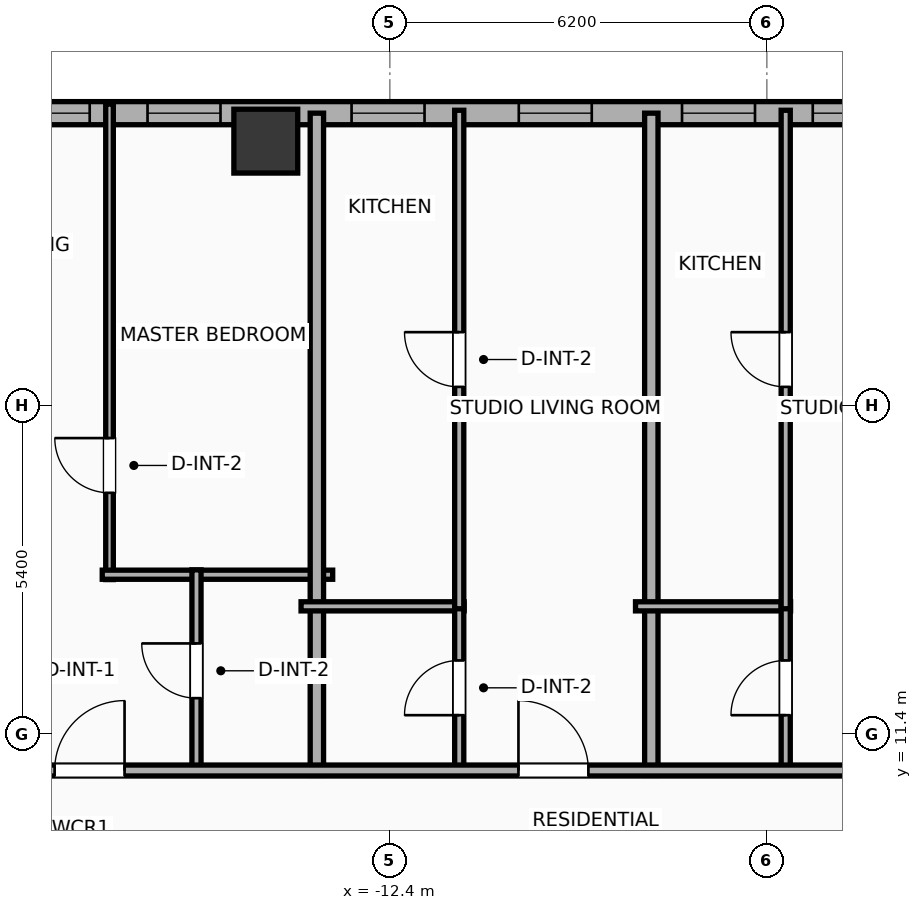
"""IFC4 building model, lengths in metres.
Left out: names, types, materials, properties, quantities, classifications, styles, units other than length and angle.
Written with IfcOpenShell. Run it as: python <this file> out.ifc"""

import sys

from ifc_helpers import new_model, si_unit, direction, frame, frame_2d, origin, origin_2d, place, context, subcontext, project, spatial, rectangle, hollow_rectangle, extrude, element, fill, save


model = new_model("IFC4")
c1 = context("Model", 3, precision=1e-05, world=origin(), true_north=direction((0.0, 1.0)))
c2 = subcontext(c1, "Body", "Model", "MODEL_VIEW")
j1 = project(units=[si_unit("LENGTHUNIT", "METRE"), si_unit("PLANEANGLEUNIT", "RADIAN")], contexts=[c1])
p1 = place(None, origin())
s1 = spatial("IfcSite", under=j1, at=p1, CompositionType="ELEMENT")
p2 = place(p1, origin())
s2 = spatial("IfcBuilding", under=s1, at=p2, CompositionType="ELEMENT")
p3 = place(p2, frame((0.0, 0.0, 109.2)))
s3 = spatial("IfcBuildingStorey", under=s2, at=p3, CompositionType="ELEMENT", Elevation=109.2)
p4 = place(p3, frame((-14.44, 21.15, 0.0), z_axis=(0.0, 0.0, 1.0), x_axis=(1.0, 0.0, 0.0)))
e1 = element("IfcColumn", 1, at=p4, inside=s3, PredefinedType="COLUMN", context=c2, shape_type="SweptSolid", body=[
    extrude(hollow_rectangle(XDim=1.05, YDim=1.05, WallThickness=0.036, at=origin_2d()), origin(), (0.0, 0.0, 1.0), 3.9),
])
p5 = place(p3, frame((-25.381, 21.61, 0.0), z_axis=(0.0, 0.0, 1.0), x_axis=(1.0, 0.0, 0.0)))
e2 = element("IfcWall", 2, at=p5, inside=s3, PredefinedType="ELEMENTEDWALL", context=c2, shape_type="SweptSolid", body=[
    extrude(rectangle(XDim=54.763, YDim=0.38, at=frame_2d((27.381, 0.0))), origin(), (0.0, 0.0, 1.0), 3.65),
])
p6 = place(p5, frame((5.645, 0.0, 0.75)))
e3 = element("IfcOpeningElement", 3, at=p6, cuts=e2, PredefinedType="OPENING", context=c2, shape_type="SweptSolid", body=[
    extrude(rectangle(XDim=2.4, YDim=2.1, at=frame_2d((1.2, 1.05))), frame((0.0, 0.2, 0.0), z_axis=(0.0, -1.0, 0.0), x_axis=(1.0, 0.0, 0.0)), (0.0, 0.0, 1.0), 0.4),
])
p7 = place(p5, frame((45.067, 0.0, 0.75)))
e4 = element("IfcOpeningElement", 4, at=p7, cuts=e2, PredefinedType="OPENING", context=c2, shape_type="SweptSolid", body=[
    extrude(rectangle(XDim=2.4, YDim=2.1, at=frame_2d((1.2, 1.05))), frame((0.0, 0.2, 0.0), z_axis=(0.0, -1.0, 0.0), x_axis=(1.0, 0.0, 0.0)), (0.0, 0.0, 1.0), 0.4),
])
p8 = place(p5, frame((1.831, 0.0, 0.75)))
e5 = element("IfcOpeningElement", 5, at=p8, cuts=e2, PredefinedType="OPENING", context=c2, shape_type="SweptSolid", body=[
    extrude(rectangle(XDim=1.2, YDim=2.05, at=frame_2d((0.6, 1.025))), frame((0.0, 0.2, 0.0), z_axis=(0.0, -1.0, 0.0), x_axis=(1.0, 0.0, 0.0)), (0.0, 0.0, 1.0), 0.4),
])
p9 = place(p5, frame((8.996, 0.0, 0.75)))
e6 = element("IfcOpeningElement", 6, at=p9, cuts=e2, PredefinedType="OPENING", context=c2, shape_type="SweptSolid", body=[
    extrude(rectangle(XDim=1.2, YDim=2.05, at=frame_2d((0.6, 1.025))), frame((0.0, 0.2, 0.0), z_axis=(0.0, -1.0, 0.0), x_axis=(1.0, 0.0, 0.0)), (0.0, 0.0, 1.0), 0.4),
])
p10 = place(p5, frame((15.102, 0.0, 0.75)))
e7 = element("IfcOpeningElement", 7, at=p10, cuts=e2, PredefinedType="OPENING", context=c2, shape_type="SweptSolid", body=[
    extrude(rectangle(XDim=1.2, YDim=2.05, at=frame_2d((0.6, 1.025))), frame((0.0, 0.2, 0.0), z_axis=(0.0, -1.0, 0.0), x_axis=(1.0, 0.0, 0.0)), (0.0, 0.0, 1.0), 0.4),
])
p11 = place(p5, frame((12.352, 0.0, 0.75)))
e8 = element("IfcOpeningElement", 8, at=p11, cuts=e2, PredefinedType="OPENING", context=c2, shape_type="SweptSolid", body=[
    extrude(rectangle(XDim=1.2, YDim=2.05, at=frame_2d((0.6, 1.025))), frame((0.0, 0.2, 0.0), z_axis=(0.0, -1.0, 0.0), x_axis=(1.0, 0.0, 0.0)), (0.0, 0.0, 1.0), 0.4),
])
p12 = place(p5, frame((19.936, 0.0, 0.75)))
e9 = element("IfcOpeningElement", 9, at=p12, cuts=e2, PredefinedType="OPENING", context=c2, shape_type="SweptSolid", body=[
    extrude(rectangle(XDim=1.2, YDim=2.05, at=frame_2d((0.6, 1.025))), frame((0.0, 0.2, 0.0), z_axis=(0.0, -1.0, 0.0), x_axis=(1.0, 0.0, 0.0)), (0.0, 0.0, 1.0), 0.4),
])
p13 = place(p5, frame((17.786, 0.0, 0.75)))
e10 = element("IfcOpeningElement", 10, at=p13, cuts=e2, PredefinedType="OPENING", context=c2, shape_type="SweptSolid", body=[
    extrude(rectangle(XDim=1.2, YDim=2.05, at=frame_2d((0.6, 1.025))), frame((0.0, 0.2, 0.0), z_axis=(0.0, -1.0, 0.0), x_axis=(1.0, 0.0, 0.0)), (0.0, 0.0, 1.0), 0.4),
])
p14 = place(p5, frame((23.826, 0.0, 0.75)))
e11 = element("IfcOpeningElement", 11, at=p14, cuts=e2, PredefinedType="OPENING", context=c2, shape_type="SweptSolid", body=[
    extrude(rectangle(XDim=1.2, YDim=2.05, at=frame_2d((0.6, 1.025))), frame((0.0, 0.2, 0.0), z_axis=(0.0, -1.0, 0.0), x_axis=(1.0, 0.0, 0.0)), (0.0, 0.0, 1.0), 0.4),
])
p15 = place(p5, frame((26.576, 0.0, 0.75)))
e12 = element("IfcOpeningElement", 12, at=p15, cuts=e2, PredefinedType="OPENING", context=c2, shape_type="SweptSolid", body=[
    extrude(rectangle(XDim=1.2, YDim=2.05, at=frame_2d((0.6, 1.025))), frame((0.0, 0.2, 0.0), z_axis=(0.0, -1.0, 0.0), x_axis=(1.0, 0.0, 0.0)), (0.0, 0.0, 1.0), 0.4),
])
p16 = place(p5, frame((30.431, 0.0, 0.75)))
e13 = element("IfcOpeningElement", 13, at=p16, cuts=e2, PredefinedType="OPENING", context=c2, shape_type="SweptSolid", body=[
    extrude(rectangle(XDim=1.2, YDim=2.05, at=frame_2d((0.6, 1.025))), frame((0.0, 0.2, 0.0), z_axis=(0.0, -1.0, 0.0), x_axis=(1.0, 0.0, 0.0)), (0.0, 0.0, 1.0), 0.4),
])
p17 = place(p5, frame((38.581, 0.0, 0.75)))
e14 = element("IfcOpeningElement", 14, at=p17, cuts=e2, PredefinedType="OPENING", context=c2, shape_type="SweptSolid", body=[
    extrude(rectangle(XDim=1.2, YDim=2.05, at=frame_2d((0.6, 1.025))), frame((0.0, 0.2, 0.0), z_axis=(0.0, -1.0, 0.0), x_axis=(1.0, 0.0, 0.0)), (0.0, 0.0, 1.0), 0.4),
])
p18 = place(p5, frame((34.786, 0.0, 0.75)))
e15 = element("IfcOpeningElement", 15, at=p18, cuts=e2, PredefinedType="OPENING", context=c2, shape_type="SweptSolid", body=[
    extrude(rectangle(XDim=1.2, YDim=2.05, at=frame_2d((0.6, 1.025))), frame((0.0, 0.2, 0.0), z_axis=(0.0, -1.0, 0.0), x_axis=(1.0, 0.0, 0.0)), (0.0, 0.0, 1.0), 0.4),
])
p19 = place(p5, frame((41.876, 0.0, 0.75)))
e16 = element("IfcOpeningElement", 16, at=p19, cuts=e2, PredefinedType="OPENING", context=c2, shape_type="SweptSolid", body=[
    extrude(rectangle(XDim=1.2, YDim=2.05, at=frame_2d((0.6, 1.025))), frame((0.0, 0.2, 0.0), z_axis=(0.0, -1.0, 0.0), x_axis=(1.0, 0.0, 0.0)), (0.0, 0.0, 1.0), 0.4),
])
p20 = place(p5, frame((49.385, 0.0, 0.75)))
e17 = element("IfcOpeningElement", 17, at=p20, cuts=e2, PredefinedType="OPENING", context=c2, shape_type="SweptSolid", body=[
    extrude(rectangle(XDim=1.2, YDim=2.05, at=frame_2d((0.6, 1.025))), frame((0.0, 0.2, 0.0), z_axis=(0.0, -1.0, 0.0), x_axis=(1.0, 0.0, 0.0)), (0.0, 0.0, 1.0), 0.4),
])
p21 = place(p5, frame((52.181, 0.0, 0.75)))
e18 = element("IfcOpeningElement", 18, at=p21, cuts=e2, PredefinedType="OPENING", context=c2, shape_type="SweptSolid", body=[
    extrude(rectangle(XDim=1.2, YDim=2.05, at=frame_2d((0.6, 1.025))), frame((0.0, 0.2, 0.0), z_axis=(0.0, -1.0, 0.0), x_axis=(1.0, 0.0, 0.0)), (0.0, 0.0, 1.0), 0.4),
])
p22 = place(p3, frame((-17.01, 13.94, 0.0), z_axis=(0.0, 0.0, 1.0), x_axis=(0.0, 1.0, 0.0)))
e19 = element("IfcWall", 19, at=p22, inside=s3, PredefinedType="PARTITIONING", context=c2, shape_type="SweptSolid", body=[
    extrude(rectangle(XDim=7.82, YDim=0.125, at=frame_2d((3.91, 0.0))), origin(), (0.0, 0.0, 1.0), 3.65),
])
p23 = place(p22, frame((1.427, 0.0, 0.0)))
e20 = element("IfcOpeningElement", 20, at=p23, cuts=e19, PredefinedType="OPENING", context=c2, shape_type="SweptSolid", body=[
    extrude(rectangle(XDim=0.9, YDim=2.05, at=frame_2d((0.45, 1.025))), frame((0.0, 0.073, 0.0), z_axis=(0.0, -1.0, 0.0), x_axis=(1.0, 0.0, 0.0)), (0.0, 0.0, 1.0), 0.145),
])
p24 = place(p3, frame((-17.13, 14.02, 0.0), z_axis=(0.0, 0.0, 1.0), x_axis=(1.0, 0.0, 0.0)))
e21 = element("IfcWall", 21, at=p24, inside=s3, PredefinedType="PLUMBINGWALL", context=c2, shape_type="SweptSolid", body=[
    extrude(rectangle(XDim=3.79, YDim=0.15, at=frame_2d((1.895, 0.0))), origin(), (0.0, 0.0, 1.0), 3.65),
])
p25 = place(p3, frame((-15.58, 10.78, 0.0), z_axis=(0.0, 0.0, 1.0), x_axis=(0.0, 1.0, 0.0)))
e22 = element("IfcWall", 22, at=p25, inside=s3, PredefinedType="PLUMBINGWALL", context=c2, shape_type="SweptSolid", body=[
    extrude(rectangle(XDim=3.32, YDim=0.15, at=frame_2d((1.66, 0.0))), origin(), (0.0, 0.0, 1.0), 3.65),
])
p26 = place(p25, frame((1.21, 0.0, 0.0)))
e23 = element("IfcOpeningElement", 23, at=p26, cuts=e22, PredefinedType="OPENING", context=c2, shape_type="SweptSolid", body=[
    extrude(rectangle(XDim=0.9, YDim=2.05, at=frame_2d((0.45, 1.025))), frame((0.0, 0.085, 0.0), z_axis=(0.0, -1.0, 0.0), x_axis=(1.0, 0.0, 0.0)), (0.0, 0.0, 1.0), 0.17),
])
p27 = place(p3, frame((-13.6, 10.72, 0.0), z_axis=(0.0, 0.0, 1.0), x_axis=(0.0, 1.0, 0.0)))
e24 = element("IfcWall", 24, at=p27, inside=s3, PredefinedType="PARTITIONING", context=c2, shape_type="SweptSolid", body=[
    extrude(rectangle(XDim=10.89, YDim=0.22, at=frame_2d((5.445, 0.0))), origin(), (0.0, 0.0, 1.0), 3.65),
])
p28 = place(p3, frame((-13.86, 13.5, 0.0), z_axis=(0.0, 0.0, 1.0), x_axis=(1.0, 0.0, 0.0)))
e25 = element("IfcWall", 25, at=p28, inside=s3, PredefinedType="PLUMBINGWALL", context=c2, shape_type="SweptSolid", body=[
    extrude(rectangle(XDim=2.681, YDim=0.15, at=frame_2d((1.341, 0.0))), origin(), (0.0, 0.0, 1.0), 3.65),
])
p29 = place(p3, frame((-11.259, 10.78, 0.0), z_axis=(0.0, 0.0, 1.0), x_axis=(0.0, 1.0, 0.0)))
e26 = element("IfcWall", 26, at=p29, inside=s3, PredefinedType="PLUMBINGWALL", context=c2, shape_type="SweptSolid", body=[
    extrude(rectangle(XDim=2.76, YDim=0.15, at=frame_2d((1.38, 0.0))), origin(), (0.0, 0.0, 1.0), 3.65),
])
p30 = place(p29, frame((0.93, 0.0, 0.0)))
e27 = element("IfcOpeningElement", 27, at=p30, cuts=e26, PredefinedType="OPENING", context=c2, shape_type="SweptSolid", body=[
    extrude(rectangle(XDim=0.9, YDim=2.05, at=frame_2d((0.45, 1.025))), frame((0.0, 0.085, 0.0), z_axis=(0.0, -1.0, 0.0), x_axis=(1.0, 0.0, 0.0)), (0.0, 0.0, 1.0), 0.17),
])
p31 = place(p3, frame((-11.259, 13.46, 0.0), z_axis=(0.0, 0.0, 1.0), x_axis=(0.0, 1.0, 0.0)))
e28 = element("IfcWall", 28, at=p31, inside=s3, PredefinedType="PLUMBINGWALL", context=c2, shape_type="SweptSolid", body=[
    extrude(rectangle(XDim=8.198, YDim=0.15, at=frame_2d((4.099, 0.0))), origin(), (0.0, 0.0, 1.0), 3.65),
])
p32 = place(p31, frame((3.649, 0.0, 0.0)))
e29 = element("IfcOpeningElement", 29, at=p32, cuts=e28, PredefinedType="OPENING", context=c2, shape_type="SweptSolid", body=[
    extrude(rectangle(XDim=0.9, YDim=2.05, at=frame_2d((0.45, 1.025))), frame((0.0, 0.085, 0.0), z_axis=(0.0, -1.0, 0.0), x_axis=(1.0, 0.0, 0.0)), (0.0, 0.0, 1.0), 0.17),
])
p33 = place(p3, frame((-8.1, 10.72, 0.0), z_axis=(0.0, 0.0, 1.0), x_axis=(0.0, 1.0, 0.0)))
e30 = element("IfcWall", 30, at=p33, inside=s3, PredefinedType="PARTITIONING", context=c2, shape_type="SweptSolid", body=[
    extrude(rectangle(XDim=10.89, YDim=0.22, at=frame_2d((5.445, 0.0))), origin(), (0.0, 0.0, 1.0), 3.65),
])
p34 = place(p3, frame((-8.36, 13.5, 0.0), z_axis=(0.0, 0.0, 1.0), x_axis=(1.0, 0.0, 0.0)))
e31 = element("IfcWall", 31, at=p34, inside=s3, PredefinedType="PLUMBINGWALL", context=c2, shape_type="SweptSolid", body=[
    extrude(rectangle(XDim=2.55, YDim=0.15, at=frame_2d((1.275, 0.0))), origin(), (0.0, 0.0, 1.0), 3.65),
])
p35 = place(p3, frame((-5.89, 10.78, 0.0), z_axis=(0.0, 0.0, 1.0), x_axis=(0.0, 1.0, 0.0)))
e32 = element("IfcWall", 32, at=p35, inside=s3, PredefinedType="PLUMBINGWALL", context=c2, shape_type="SweptSolid", body=[
    extrude(rectangle(XDim=2.76, YDim=0.15, at=frame_2d((1.38, 0.0))), origin(), (0.0, 0.0, 1.0), 3.65),
])
p36 = place(p35, frame((0.93, 0.0, 0.0)))
e33 = element("IfcOpeningElement", 33, at=p36, cuts=e32, PredefinedType="OPENING", context=c2, shape_type="SweptSolid", body=[
    extrude(rectangle(XDim=0.9, YDim=2.05, at=frame_2d((0.45, 1.025))), frame((0.0, 0.085, 0.0), z_axis=(0.0, -1.0, 0.0), x_axis=(1.0, 0.0, 0.0)), (0.0, 0.0, 1.0), 0.17),
])
p37 = place(p3, frame((-5.89, 13.46, 0.0), z_axis=(0.0, 0.0, 1.0), x_axis=(0.0, 1.0, 0.0)))
e34 = element("IfcWall", 34, at=p37, inside=s3, PredefinedType="PLUMBINGWALL", context=c2, shape_type="SweptSolid", body=[
    extrude(rectangle(XDim=8.198, YDim=0.15, at=frame_2d((4.099, 0.0))), origin(), (0.0, 0.0, 1.0), 3.65),
])
p38 = place(p37, frame((3.649, 0.0, 0.0)))
e35 = element("IfcOpeningElement", 35, at=p38, cuts=e34, PredefinedType="OPENING", context=c2, shape_type="SweptSolid", body=[
    extrude(rectangle(XDim=0.9, YDim=2.05, at=frame_2d((0.45, 1.025))), frame((0.0, 0.085, 0.0), z_axis=(0.0, -1.0, 0.0), x_axis=(1.0, 0.0, 0.0)), (0.0, 0.0, 1.0), 0.17),
])
p39 = place(p3, frame((-29.21, 10.8, 0.0), z_axis=(0.0, 0.0, 1.0), x_axis=(1.0, 0.0, 0.0)))
e36 = element("IfcWall", 36, at=p39, inside=s3, PredefinedType="PARTITIONING", context=c2, shape_type="SweptSolid", body=[
    extrude(rectangle(XDim=62.42, YDim=0.18, at=frame_2d((31.21, 0.0))), origin(), (0.0, 0.0, 1.0), 3.65),
])
p40 = place(p39, frame((3.457, 0.0, 0.0)))
e37 = element("IfcOpeningElement", 37, at=p40, cuts=e36, PredefinedType="OPENING", context=c2, shape_type="SweptSolid", body=[
    extrude(rectangle(XDim=1.15, YDim=2.05, at=frame_2d((0.575, 1.025))), frame((0.0, 0.1, 0.0), z_axis=(0.0, -1.0, 0.0), x_axis=(1.0, 0.0, 0.0)), (0.0, 0.0, 1.0), 0.2),
])
p41 = place(p39, frame((11.297, 0.0, 0.0)))
e38 = element("IfcOpeningElement", 38, at=p41, cuts=e36, PredefinedType="OPENING", context=c2, shape_type="SweptSolid", body=[
    extrude(rectangle(XDim=1.15, YDim=2.05, at=frame_2d((0.575, 1.025))), frame((0.0, 0.1, 0.0), z_axis=(0.0, -1.0, 0.0), x_axis=(1.0, 0.0, 0.0)), (0.0, 0.0, 1.0), 0.2),
])
p42 = place(p39, frame((18.925, 0.0, 0.0)))
e39 = element("IfcOpeningElement", 39, at=p42, cuts=e36, PredefinedType="OPENING", context=c2, shape_type="SweptSolid", body=[
    extrude(rectangle(XDim=1.15, YDim=2.05, at=frame_2d((0.575, 1.025))), frame((0.0, 0.1, 0.0), z_axis=(0.0, -1.0, 0.0), x_axis=(1.0, 0.0, 0.0)), (0.0, 0.0, 1.0), 0.2),
])
p43 = place(p39, frame((24.362, 0.0, 0.0)))
e40 = element("IfcOpeningElement", 40, at=p43, cuts=e36, PredefinedType="OPENING", context=c2, shape_type="SweptSolid", body=[
    extrude(rectangle(XDim=1.15, YDim=2.05, at=frame_2d((0.575, 1.025))), frame((0.0, 0.1, 0.0), z_axis=(0.0, -1.0, 0.0), x_axis=(1.0, 0.0, 0.0)), (0.0, 0.0, 1.0), 0.2),
])
p44 = place(p39, frame((27.708, 0.0, 0.0)))
e41 = element("IfcOpeningElement", 41, at=p44, cuts=e36, PredefinedType="OPENING", context=c2, shape_type="SweptSolid", body=[
    extrude(rectangle(XDim=1.15, YDim=2.05, at=frame_2d((0.575, 1.025))), frame((0.0, 0.1, 0.0), z_axis=(0.0, -1.0, 0.0), x_axis=(1.0, 0.0, 0.0)), (0.0, 0.0, 1.0), 0.2),
])
p45 = place(p39, frame((34.618, 0.0, 0.0)))
e42 = element("IfcOpeningElement", 42, at=p45, cuts=e36, PredefinedType="OPENING", context=c2, shape_type="SweptSolid", body=[
    extrude(rectangle(XDim=0.9, YDim=2.05, at=frame_2d((0.45, 1.025))), frame((0.0, 0.1, 0.0), z_axis=(0.0, -1.0, 0.0), x_axis=(1.0, 0.0, 0.0)), (0.0, 0.0, 1.0), 0.2),
])
p46 = place(p39, frame((43.106, 0.0, 0.0)))
e43 = element("IfcOpeningElement", 43, at=p46, cuts=e36, PredefinedType="OPENING", context=c2, shape_type="SweptSolid", body=[
    extrude(rectangle(XDim=1.15, YDim=2.05, at=frame_2d((0.575, 1.025))), frame((0.0, 0.1, 0.0), z_axis=(0.0, -1.0, 0.0), x_axis=(1.0, 0.0, 0.0)), (0.0, 0.0, 1.0), 0.2),
])
p47 = place(p39, frame((51.777, 0.0, 0.0)))
e44 = element("IfcOpeningElement", 44, at=p47, cuts=e36, PredefinedType="OPENING", context=c2, shape_type="SweptSolid", body=[
    extrude(rectangle(XDim=0.9, YDim=2.05, at=frame_2d((0.45, 1.025))), frame((0.0, 0.1, 0.0), z_axis=(0.0, -1.0, 0.0), x_axis=(1.0, 0.0, 0.0)), (0.0, 0.0, 1.0), 0.2),
])
p48 = place(p39, frame((58.718, 0.0, 0.0)))
e45 = element("IfcOpeningElement", 45, at=p48, cuts=e36, PredefinedType="OPENING", context=c2, shape_type="SweptSolid", body=[
    extrude(rectangle(XDim=0.9, YDim=2.05, at=frame_2d((0.45, 1.025))), frame((0.0, 0.1, 0.0), z_axis=(0.0, -1.0, 0.0), x_axis=(1.0, 0.0, 0.0)), (0.0, 0.0, 1.0), 0.2),
])
p49 = place(p6, origin())
e46 = element("IfcWindow", 46, at=p49, inside=s3, PartitioningType="SINGLE_PANEL", PredefinedType="WINDOW", context=c2, shape_type="SweptSolid", body=[
    extrude(rectangle(XDim=2.4, YDim=2.1, at=frame_2d((1.2, 1.05))), frame((0.0, 0.03, 0.0), z_axis=(0.0, -1.0, 0.0), x_axis=(1.0, 0.0, 0.0)), (0.0, 0.0, 1.0), 0.06),
])
fill(e3, e46)
p50 = place(p9, origin())
e47 = element("IfcWindow", 47, at=p50, inside=s3, PartitioningType="SINGLE_PANEL", PredefinedType="WINDOW", context=c2, shape_type="SweptSolid", body=[
    extrude(rectangle(XDim=1.2, YDim=2.05, at=frame_2d((0.6, 1.025))), frame((0.0, 0.03, 0.0), z_axis=(0.0, -1.0, 0.0), x_axis=(1.0, 0.0, 0.0)), (0.0, 0.0, 1.0), 0.06),
])
fill(e6, e47)
p51 = place(p10, origin())
e48 = element("IfcWindow", 48, at=p51, inside=s3, PartitioningType="SINGLE_PANEL", PredefinedType="WINDOW", context=c2, shape_type="SweptSolid", body=[
    extrude(rectangle(XDim=1.2, YDim=2.05, at=frame_2d((0.6, 1.025))), frame((0.0, 0.03, 0.0), z_axis=(0.0, -1.0, 0.0), x_axis=(1.0, 0.0, 0.0)), (0.0, 0.0, 1.0), 0.06),
])
fill(e7, e48)
p52 = place(p11, origin())
e49 = element("IfcWindow", 49, at=p52, inside=s3, PartitioningType="SINGLE_PANEL", PredefinedType="WINDOW", context=c2, shape_type="SweptSolid", body=[
    extrude(rectangle(XDim=1.2, YDim=2.05, at=frame_2d((0.6, 1.025))), frame((0.0, 0.03, 0.0), z_axis=(0.0, -1.0, 0.0), x_axis=(1.0, 0.0, 0.0)), (0.0, 0.0, 1.0), 0.06),
])
fill(e8, e49)
p53 = place(p12, origin())
e50 = element("IfcWindow", 50, at=p53, inside=s3, PartitioningType="SINGLE_PANEL", PredefinedType="WINDOW", context=c2, shape_type="SweptSolid", body=[
    extrude(rectangle(XDim=1.2, YDim=2.05, at=frame_2d((0.6, 1.025))), frame((0.0, 0.03, 0.0), z_axis=(0.0, -1.0, 0.0), x_axis=(1.0, 0.0, 0.0)), (0.0, 0.0, 1.0), 0.06),
])
fill(e9, e50)
p54 = place(p13, origin())
e51 = element("IfcWindow", 51, at=p54, inside=s3, PartitioningType="SINGLE_PANEL", PredefinedType="WINDOW", context=c2, shape_type="SweptSolid", body=[
    extrude(rectangle(XDim=1.2, YDim=2.05, at=frame_2d((0.6, 1.025))), frame((0.0, 0.03, 0.0), z_axis=(0.0, -1.0, 0.0), x_axis=(1.0, 0.0, 0.0)), (0.0, 0.0, 1.0), 0.06),
])
fill(e10, e51)
p55 = place(p23, origin())
e52 = element("IfcDoor", 52, at=p55, inside=s3, OperationType="SINGLE_SWING_RIGHT", PredefinedType="DOOR", context=c2, shape_type="SweptSolid", body=[
    extrude(rectangle(XDim=0.9, YDim=2.05, at=frame_2d((0.45, 1.025))), frame((0.0, 0.025, 0.0), z_axis=(0.0, -1.0, 0.0), x_axis=(1.0, 0.0, 0.0)), (0.0, 0.0, 1.0), 0.05),
])
fill(e20, e52)
p56 = place(p26, origin())
e53 = element("IfcDoor", 53, at=p56, inside=s3, OperationType="SINGLE_SWING_RIGHT", PredefinedType="DOOR", context=c2, shape_type="SweptSolid", body=[
    extrude(rectangle(XDim=0.9, YDim=2.05, at=frame_2d((0.45, 1.025))), frame((0.0, 0.025, 0.0), z_axis=(0.0, -1.0, 0.0), x_axis=(1.0, 0.0, 0.0)), (0.0, 0.0, 1.0), 0.05),
])
fill(e23, e53)
p57 = place(p30, origin())
e54 = element("IfcDoor", 54, at=p57, inside=s3, OperationType="SINGLE_SWING_LEFT", PredefinedType="DOOR", context=c2, shape_type="SweptSolid", body=[
    extrude(rectangle(XDim=0.9, YDim=2.05, at=frame_2d((0.45, 1.025))), frame((0.0, 0.025, 0.0), z_axis=(0.0, -1.0, 0.0), x_axis=(1.0, 0.0, 0.0)), (0.0, 0.0, 1.0), 0.05),
])
fill(e27, e54)
p58 = place(p32, origin())
e55 = element("IfcDoor", 55, at=p58, inside=s3, OperationType="SINGLE_SWING_RIGHT", PredefinedType="DOOR", context=c2, shape_type="SweptSolid", body=[
    extrude(rectangle(XDim=0.9, YDim=2.05, at=frame_2d((0.45, 1.025))), frame((0.0, 0.025, 0.0), z_axis=(0.0, -1.0, 0.0), x_axis=(1.0, 0.0, 0.0)), (0.0, 0.0, 1.0), 0.05),
])
fill(e29, e55)
p59 = place(p36, origin())
e56 = element("IfcDoor", 56, at=p59, inside=s3, OperationType="SINGLE_SWING_LEFT", PredefinedType="DOOR", context=c2, shape_type="SweptSolid", body=[
    extrude(rectangle(XDim=0.9, YDim=2.05, at=frame_2d((0.45, 1.025))), frame((0.0, 0.025, 0.0), z_axis=(0.0, -1.0, 0.0), x_axis=(1.0, 0.0, 0.0)), (0.0, 0.0, 1.0), 0.05),
])
fill(e33, e56)
p60 = place(p38, origin())
e57 = element("IfcDoor", 57, at=p60, inside=s3, OperationType="SINGLE_SWING_RIGHT", PredefinedType="DOOR", context=c2, shape_type="SweptSolid", body=[
    extrude(rectangle(XDim=0.9, YDim=2.05, at=frame_2d((0.45, 1.025))), frame((0.0, 0.025, 0.0), z_axis=(0.0, -1.0, 0.0), x_axis=(1.0, 0.0, 0.0)), (0.0, 0.0, 1.0), 0.05),
])
fill(e35, e57)
p61 = place(p41, origin())
e58 = element("IfcDoor", 58, at=p61, inside=s3, OperationType="SINGLE_SWING_RIGHT", PredefinedType="DOOR", context=c2, shape_type="SweptSolid", body=[
    extrude(rectangle(XDim=1.15, YDim=2.05, at=frame_2d((0.575, 1.025))), frame((0.0, 0.025, 0.0), z_axis=(0.0, -1.0, 0.0), x_axis=(1.0, 0.0, 0.0)), (0.0, 0.0, 1.0), 0.05),
])
fill(e38, e58)
p62 = place(p42, origin())
e59 = element("IfcDoor", 59, at=p62, inside=s3, OperationType="SINGLE_SWING_LEFT", PredefinedType="DOOR", context=c2, shape_type="SweptSolid", body=[
    extrude(rectangle(XDim=1.15, YDim=2.05, at=frame_2d((0.575, 1.025))), frame((0.0, 0.025, 0.0), z_axis=(0.0, -1.0, 0.0), x_axis=(1.0, 0.0, 0.0)), (0.0, 0.0, 1.0), 0.05),
])
fill(e39, e59)
save(model, sys.argv[1])
